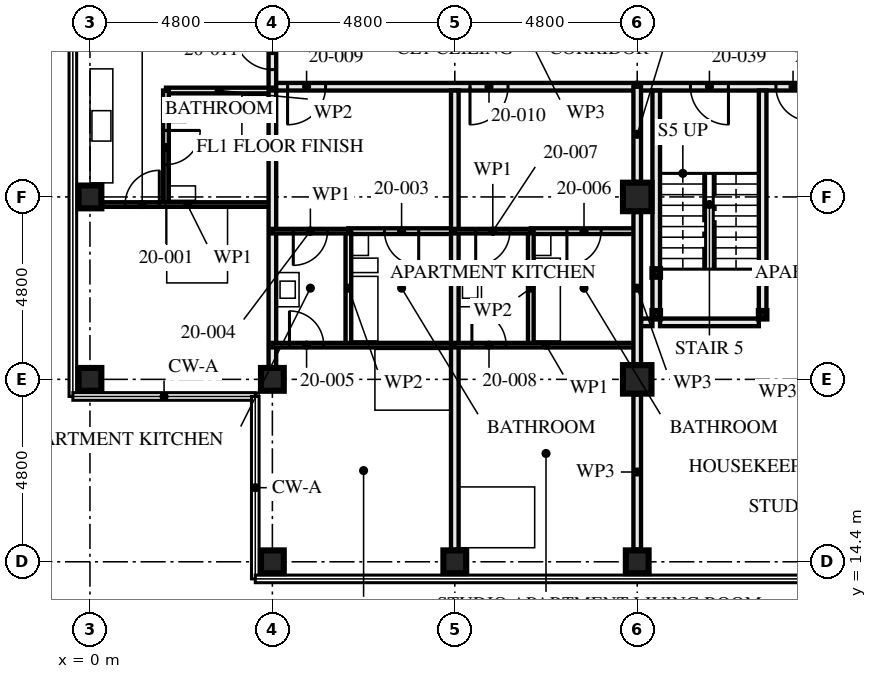
"""IFC4 building model, lengths in metres.
Left out: names, types, materials, properties, quantities, classifications, styles, units other than length and angle.
Written with IfcOpenShell. Run it as: python <this file> out.ifc"""

import sys

from ifc_helpers import new_model, si_unit, direction, frame, frame_2d, origin, origin_2d, place, context, subcontext, project, spatial, rectangle, hollow_rectangle, extrude, element, fill, save


model = new_model("IFC4")
c1 = context("Model", 3, precision=1e-05, world=origin(), true_north=direction((0.0, 1.0)))
c2 = subcontext(c1, "Body", "Model", "MODEL_VIEW")
j1 = project(units=[si_unit("LENGTHUNIT", "METRE"), si_unit("PLANEANGLEUNIT", "RADIAN")], contexts=[c1])
p1 = place(None, origin())
s1 = spatial("IfcSite", under=j1, at=p1, CompositionType="ELEMENT")
p2 = place(p1, origin())
s2 = spatial("IfcBuilding", under=s1, at=p2, CompositionType="ELEMENT")
p3 = place(p2, frame((0.0, 0.0, 76.0)))
s3 = spatial("IfcBuildingStorey", under=s2, at=p3, CompositionType="ELEMENT", Elevation=76.0)
for number, where, z_axis, x_axis in (
    (1, (0.0, 19.2, 0.0), (0.0, 0.0, 1.0), (0.0, 1.0, 0.0)),
    (2, (0.0, 24.0, 0.0), (0.0, 0.0, 1.0), (1.0, 0.0, 0.0)),
    (3, (4.8, 14.4, 0.0), (0.0, 0.0, 1.0), (0.0, 1.0, 0.0)),
    (4, (4.8, 19.2, 0.0), (0.0, 0.0, 1.0), (0.0, 1.0, 0.0)),
    (5, (9.6, 14.4, 0.0), (0.0, 0.0, 1.0), (0.0, 1.0, 0.0)),
    (6, (14.4, 14.4, 0.0), (0.0, 0.0, 1.0), (0.0, 1.0, 0.0)),
):
    element("IfcColumn", number, at=place(p3, frame(where, z_axis=z_axis, x_axis=x_axis)), inside=s3, PredefinedType="COLUMN", context=c2, shape_type="SweptSolid", body=[
        extrude(hollow_rectangle(XDim=0.6, YDim=0.6, WallThickness=0.08, at=origin_2d()), origin(), (0.0, 0.0, 1.0), 3.5),
    ])
for number, where, z_axis, x_axis in (
    (7, (14.4, 19.2, 0.0), (0.0, 0.0, 1.0), (1.0, 0.0, 0.0)),
    (8, (14.4, 24.0, 0.0), (0.0, 0.0, 1.0), (1.0, 0.0, 0.0)),
):
    element("IfcColumn", number, at=place(p3, frame(where, z_axis=z_axis, x_axis=x_axis)), inside=s3, PredefinedType="COLUMN", context=c2, shape_type="SweptSolid", body=[
        extrude(hollow_rectangle(XDim=0.75, YDim=0.75, WallThickness=0.08, at=origin_2d()), origin(), (0.0, 0.0, 1.0), 3.5),
    ])
for number, where, z_axis, x_axis in (
    (9, (14.9, 20.9, 0.0), (0.0, 0.0, 1.0), (1.0, 0.0, 0.0)),
    (10, (17.7, 20.9, 0.0), (0.0, 0.0, 1.0), (1.0, 0.0, 0.0)),
    (11, (14.9, 22.0, 0.0), (0.0, 0.0, 1.0), (1.0, 0.0, 0.0)),
    (12, (17.7, 22.0, 0.0), (0.0, 0.0, 1.0), (1.0, 0.0, 0.0)),
):
    element("IfcColumn", number, at=place(p3, frame(where, z_axis=z_axis, x_axis=x_axis)), inside=s3, PredefinedType="COLUMN", context=c2, shape_type="SweptSolid", body=[
        extrude(hollow_rectangle(XDim=0.2, YDim=0.2, WallThickness=0.008, at=origin_2d()), origin(), (0.0, 0.0, 1.0), 3.25),
    ])
p4 = place(p3, frame((2.0, 23.8, 0.0), z_axis=(0.0, 0.0, 1.0), x_axis=(0.0, 1.0, 0.0)))
e13 = element("IfcWall", 13, at=p4, inside=s3, PredefinedType="PARTITIONING", context=c2, shape_type="SweptSolid", body=[
    extrude(rectangle(XDim=3.0, YDim=0.15, at=frame_2d((1.5, 0.0))), origin(), (0.0, 0.0, 1.0), 2.04),
])
p5 = place(p4, frame((1.05, 0.0, 0.0)))
e14 = element("IfcOpeningElement", 14, at=p5, cuts=e13, PredefinedType="OPENING", context=c2, shape_type="SweptSolid", body=[
    extrude(rectangle(XDim=0.9, YDim=2.0, at=frame_2d((0.45, 1.0))), frame((0.0, 0.085, 0.0), z_axis=(0.0, -1.0, 0.0), x_axis=(1.0, 0.0, 0.0)), (0.0, 0.0, 1.0), 0.171),
])
p6 = place(p3, frame((2.0, 26.8, 0.0), z_axis=(0.0, 0.0, 1.0), x_axis=(1.0, 0.0, 0.0)))
e15 = element("IfcWall", 15, at=p6, inside=s3, PredefinedType="PARTITIONING", context=c2, shape_type="SweptSolid", body=[
    extrude(rectangle(XDim=2.8, YDim=0.15, at=frame_2d((1.4, 0.0))), origin(), (0.0, 0.0, 1.0), 3.25),
])
p7 = place(p3, frame((0.32, 23.8, 0.0), z_axis=(0.0, 0.0, 1.0), x_axis=(1.0, 0.0, 0.0)))
e16 = element("IfcWall", 16, at=p7, inside=s3, PredefinedType="PARTITIONING", context=c2, shape_type="SweptSolid", body=[
    extrude(rectangle(XDim=4.48, YDim=0.12, at=frame_2d((2.24, 0.0))), origin(), (0.0, 0.0, 1.0), 2.04),
])
p8 = place(p7, frame((0.605, 0.0, 0.0)))
e17 = element("IfcOpeningElement", 17, at=p8, cuts=e16, PredefinedType="OPENING", context=c2, shape_type="SweptSolid", body=[
    extrude(rectangle(XDim=0.9, YDim=2.0, at=frame_2d((0.45, 1.0))), frame((0.0, 0.071, 0.0), z_axis=(0.0, -1.0, 0.0), x_axis=(1.0, 0.0, 0.0)), (0.0, 0.0, 1.0), 0.141),
])
p9 = place(p3, frame((4.8, 19.52, 0.0), z_axis=(0.0, 0.0, 1.0), x_axis=(0.0, 1.0, 0.0)))
e18 = element("IfcWall", 18, at=p9, inside=s3, PredefinedType="PARTITIONING", context=c2, shape_type="SweptSolid", body=[
    extrude(rectangle(XDim=7.28, YDim=0.2, at=frame_2d((3.64, 0.0))), origin(), (0.0, 0.0, 1.0), 2.04),
])
p10 = place(p3, frame((6.8, 20.1, 0.0), z_axis=(0.0, 0.0, 1.0), x_axis=(0.0, 1.0, 0.0)))
e19 = element("IfcWall", 19, at=p10, inside=s3, PredefinedType="PARTITIONING", context=c2, shape_type="SweptSolid", body=[
    extrude(rectangle(XDim=3.0, YDim=0.15, at=frame_2d((1.5, 0.0))), origin(), (0.0, 0.0, 1.0), 3.25),
])
p11 = place(p3, frame((6.8, 23.1, 0.0), z_axis=(0.0, 0.0, 1.0), x_axis=(1.0, 0.0, 0.0)))
e20 = element("IfcWall", 20, at=p11, inside=s3, PredefinedType="PARTITIONING", context=c2, shape_type="SweptSolid", body=[
    extrude(rectangle(XDim=2.8, YDim=0.15, at=frame_2d((1.4, 0.0))), origin(), (0.0, 0.0, 1.0), 3.25),
])
p12 = place(p11, frame((0.95, 0.0, 0.0)))
e21 = element("IfcOpeningElement", 21, at=p12, cuts=e20, PredefinedType="OPENING", context=c2, shape_type="SweptSolid", body=[
    extrude(rectangle(XDim=0.9, YDim=2.1, at=frame_2d((0.45, 1.05))), frame((0.0, 0.085, 0.0), z_axis=(0.0, -1.0, 0.0), x_axis=(1.0, 0.0, 0.0)), (0.0, 0.0, 1.0), 0.171),
])
p13 = place(p3, frame((4.8, 23.1, 0.0), z_axis=(0.0, 0.0, 1.0), x_axis=(1.0, 0.0, 0.0)))
e22 = element("IfcWall", 22, at=p13, inside=s3, PredefinedType="PARTITIONING", context=c2, shape_type="SweptSolid", body=[
    extrude(rectangle(XDim=2.0, YDim=0.12, at=frame_2d((1.0, 0.0))), origin(), (0.0, 0.0, 1.0), 3.25),
])
p14 = place(p13, frame((0.55, 0.0, 0.0)))
e23 = element("IfcOpeningElement", 23, at=p14, cuts=e22, PredefinedType="OPENING", context=c2, shape_type="SweptSolid", body=[
    extrude(rectangle(XDim=0.9, YDim=2.1, at=frame_2d((0.45, 1.05))), frame((0.0, 0.071, 0.0), z_axis=(0.0, -1.0, 0.0), x_axis=(1.0, 0.0, 0.0)), (0.0, 0.0, 1.0), 0.141),
])
p15 = place(p3, frame((4.8, 20.1, 0.0), z_axis=(0.0, 0.0, 1.0), x_axis=(1.0, 0.0, 0.0)))
e24 = element("IfcWall", 24, at=p15, inside=s3, PredefinedType="PARTITIONING", context=c2, shape_type="SweptSolid", body=[
    extrude(rectangle(XDim=4.8, YDim=0.12, at=frame_2d((2.4, 0.0))), origin(), (0.0, 0.0, 1.0), 3.25),
])
p16 = place(p15, frame((0.45, 0.0, 0.0)))
e25 = element("IfcOpeningElement", 25, at=p16, cuts=e24, PredefinedType="OPENING", context=c2, shape_type="SweptSolid", body=[
    extrude(rectangle(XDim=0.9, YDim=2.1, at=frame_2d((0.45, 1.05))), frame((0.0, 0.071, 0.0), z_axis=(0.0, -1.0, 0.0), x_axis=(1.0, 0.0, 0.0)), (0.0, 0.0, 1.0), 0.141),
])
p17 = place(p3, frame((9.6, 14.72, 0.0), z_axis=(0.0, 0.0, 1.0), x_axis=(0.0, 1.0, 0.0)))
e26 = element("IfcWall", 26, at=p17, inside=s3, PredefinedType="PARTITIONING", context=c2, shape_type="SweptSolid", body=[
    extrude(rectangle(XDim=12.08, YDim=0.2, at=frame_2d((6.04, 0.0))), origin(), (0.0, 0.0, 1.0), 2.04),
])
p18 = place(p3, frame((11.6, 20.1, 0.0), z_axis=(0.0, 0.0, 1.0), x_axis=(0.0, 1.0, 0.0)))
e27 = element("IfcWall", 27, at=p18, inside=s3, PredefinedType="PARTITIONING", context=c2, shape_type="SweptSolid", body=[
    extrude(rectangle(XDim=3.0, YDim=0.15, at=frame_2d((1.5, 0.0))), origin(), (0.0, 0.0, 1.0), 3.25),
])
p19 = place(p3, frame((11.6, 23.1, 0.0), z_axis=(0.0, 0.0, 1.0), x_axis=(1.0, 0.0, 0.0)))
e28 = element("IfcWall", 28, at=p19, inside=s3, PredefinedType="PARTITIONING", context=c2, shape_type="SweptSolid", body=[
    extrude(rectangle(XDim=2.8, YDim=0.15, at=frame_2d((1.4, 0.0))), origin(), (0.0, 0.0, 1.0), 3.25),
])
p20 = place(p19, frame((0.95, 0.0, 0.0)))
e29 = element("IfcOpeningElement", 29, at=p20, cuts=e28, PredefinedType="OPENING", context=c2, shape_type="SweptSolid", body=[
    extrude(rectangle(XDim=0.9, YDim=2.1, at=frame_2d((0.45, 1.05))), frame((0.0, 0.085, 0.0), z_axis=(0.0, -1.0, 0.0), x_axis=(1.0, 0.0, 0.0)), (0.0, 0.0, 1.0), 0.171),
])
p21 = place(p3, frame((9.6, 23.1, 0.0), z_axis=(0.0, 0.0, 1.0), x_axis=(1.0, 0.0, 0.0)))
e30 = element("IfcWall", 30, at=p21, inside=s3, PredefinedType="PARTITIONING", context=c2, shape_type="SweptSolid", body=[
    extrude(rectangle(XDim=2.0, YDim=0.12, at=frame_2d((1.0, 0.0))), origin(), (0.0, 0.0, 1.0), 3.25),
])
p22 = place(p21, frame((0.55, 0.0, 0.0)))
e31 = element("IfcOpeningElement", 31, at=p22, cuts=e30, PredefinedType="OPENING", context=c2, shape_type="SweptSolid", body=[
    extrude(rectangle(XDim=0.9, YDim=2.1, at=frame_2d((0.45, 1.05))), frame((0.0, 0.071, 0.0), z_axis=(0.0, -1.0, 0.0), x_axis=(1.0, 0.0, 0.0)), (0.0, 0.0, 1.0), 0.141),
])
p23 = place(p3, frame((9.6, 20.1, 0.0), z_axis=(0.0, 0.0, 1.0), x_axis=(1.0, 0.0, 0.0)))
e32 = element("IfcWall", 32, at=p23, inside=s3, PredefinedType="PARTITIONING", context=c2, shape_type="SweptSolid", body=[
    extrude(rectangle(XDim=4.8, YDim=0.12, at=frame_2d((2.4, 0.0))), origin(), (0.0, 0.0, 1.0), 3.25),
])
p24 = place(p23, frame((0.45, 0.0, 0.0)))
e33 = element("IfcOpeningElement", 33, at=p24, cuts=e32, PredefinedType="OPENING", context=c2, shape_type="SweptSolid", body=[
    extrude(rectangle(XDim=0.9, YDim=2.1, at=frame_2d((0.45, 1.05))), frame((0.0, 0.071, 0.0), z_axis=(0.0, -1.0, 0.0), x_axis=(1.0, 0.0, 0.0)), (0.0, 0.0, 1.0), 0.141),
])
p25 = place(p3, frame((4.8, 26.9, 0.0), z_axis=(0.0, 0.0, 1.0), x_axis=(1.0, 0.0, 0.0)))
e34 = element("IfcWall", 34, at=p25, inside=s3, PredefinedType="PARTITIONING", context=c2, shape_type="SweptSolid", body=[
    extrude(rectangle(XDim=9.6, YDim=0.2, at=frame_2d((4.8, 0.0))), origin(), (0.0, 0.0, 1.0), 3.25),
])
p26 = place(p25, frame((0.4, 0.0, 0.0)))
e35 = element("IfcOpeningElement", 35, at=p26, cuts=e34, PredefinedType="OPENING", context=c2, shape_type="SweptSolid", body=[
    extrude(rectangle(XDim=1.0, YDim=2.1, at=frame_2d((0.5, 1.05))), frame((0.0, 0.111, 0.0), z_axis=(0.0, -1.0, 0.0), x_axis=(1.0, 0.0, 0.0)), (0.0, 0.0, 1.0), 0.221),
])
p27 = place(p25, frame((5.2, 0.0, 0.0)))
e36 = element("IfcOpeningElement", 36, at=p27, cuts=e34, PredefinedType="OPENING", context=c2, shape_type="SweptSolid", body=[
    extrude(rectangle(XDim=1.0, YDim=2.1, at=frame_2d((0.5, 1.05))), frame((0.0, 0.111, 0.0), z_axis=(0.0, -1.0, 0.0), x_axis=(1.0, 0.0, 0.0)), (0.0, 0.0, 1.0), 0.221),
])
p28 = place(p3, frame((4.8, 26.8, 0.0), z_axis=(0.0, 0.0, 1.0), x_axis=(0.0, 1.0, 0.0)))
e37 = element("IfcWall", 37, at=p28, inside=s3, PredefinedType="PARTITIONING", context=c2, shape_type="SweptSolid", body=[
    extrude(rectangle(XDim=1.605, YDim=0.2, at=frame_2d((0.802, 0.0))), origin(), (0.0, 0.0, 1.0), 3.25),
])
p29 = place(p28, frame((0.55, 0.0, 0.0)))
e38 = element("IfcOpeningElement", 38, at=p29, cuts=e37, PredefinedType="OPENING", context=c2, shape_type="SweptSolid", body=[
    extrude(rectangle(XDim=1.0, YDim=2.1, at=frame_2d((0.5, 1.05))), frame((0.0, 0.111, 0.0), z_axis=(0.0, -1.0, 0.0), x_axis=(1.0, 0.0, 0.0)), (0.0, 0.0, 1.0), 0.221),
])
p30 = place(p3, frame((14.9, 21.0, 0.0), z_axis=(0.0, 0.0, 1.0), x_axis=(0.0, 1.0, 0.0)))
e39 = element("IfcWall", 39, at=p30, inside=s3, PredefinedType="SOLIDWALL", context=c2, shape_type="SweptSolid", body=[
    extrude(rectangle(XDim=0.9, YDim=0.2, at=frame_2d((0.45, 0.0))), origin(), (0.0, 0.0, 1.0), 2.94),
])
p31 = place(p3, frame((14.9, 22.1, 0.0), z_axis=(0.0, 0.0, 1.0), x_axis=(0.0, 1.0, 0.0)))
e40 = element("IfcWall", 40, at=p31, inside=s3, PredefinedType="SOLIDWALL", context=c2, shape_type="SweptSolid", body=[
    extrude(rectangle(XDim=4.7, YDim=0.2, at=frame_2d((2.35, 0.0))), origin(), (0.0, 0.0, 1.0), 2.94),
])
p32 = place(p3, frame((17.7, 21.0, 0.0), z_axis=(0.0, 0.0, 1.0), x_axis=(0.0, 1.0, 0.0)))
e41 = element("IfcWall", 41, at=p32, inside=s3, PredefinedType="SOLIDWALL", context=c2, shape_type="SweptSolid", body=[
    extrude(rectangle(XDim=0.9, YDim=0.2, at=frame_2d((0.45, 0.0))), origin(), (0.0, 0.0, 1.0), 2.94),
])
p33 = place(p3, frame((17.7, 22.1, 0.0), z_axis=(0.0, 0.0, 1.0), x_axis=(0.0, 1.0, 0.0)))
e42 = element("IfcWall", 42, at=p33, inside=s3, PredefinedType="SOLIDWALL", context=c2, shape_type="SweptSolid", body=[
    extrude(rectangle(XDim=4.7, YDim=0.2, at=frame_2d((2.35, 0.0))), origin(), (0.0, 0.0, 1.0), 2.94),
])
p34 = place(p3, frame((14.5, 20.7, 0.0), z_axis=(0.0, 0.0, 1.0), x_axis=(1.0, 0.0, 0.0)))
e43 = element("IfcWall", 43, at=p34, inside=s3, PredefinedType="SOLIDWALL", context=c2, shape_type="SweptSolid", body=[
    extrude(rectangle(XDim=0.3, YDim=0.2, at=frame_2d((0.15, 0.0))), origin(), (0.0, 0.0, 1.0), 3.25),
])
p35 = place(p3, frame((15.0, 20.7, 0.0), z_axis=(0.0, 0.0, 1.0), x_axis=(1.0, 0.0, 0.0)))
e44 = element("IfcWall", 44, at=p35, inside=s3, PredefinedType="SOLIDWALL", context=c2, shape_type="SweptSolid", body=[
    extrude(rectangle(XDim=2.6, YDim=0.2, at=frame_2d((1.3, 0.0))), origin(), (0.0, 0.0, 1.0), 3.25),
])
p36 = place(p3, frame((14.4, 26.9, 0.0), z_axis=(0.0, 0.0, 1.0), x_axis=(1.0, 0.0, 0.0)))
e45 = element("IfcWall", 45, at=p36, inside=s3, PredefinedType="PARTITIONING", context=c2, shape_type="SweptSolid", body=[
    extrude(rectangle(XDim=14.4, YDim=0.2, at=frame_2d((7.2, 0.0))), origin(), (0.0, 0.0, 1.0), 2.04),
])
p37 = place(p36, frame((1.4, 0.0, 0.0)))
e46 = element("IfcOpeningElement", 46, at=p37, cuts=e45, PredefinedType="OPENING", context=c2, shape_type="SweptSolid", body=[
    extrude(rectangle(XDim=1.0, YDim=2.0, at=frame_2d((0.5, 1.0))), frame((0.0, 0.111, 0.0), z_axis=(0.0, -1.0, 0.0), x_axis=(1.0, 0.0, 0.0)), (0.0, 0.0, 1.0), 0.221),
])
p38 = place(p36, frame((3.65, 0.0, 0.0)))
e47 = element("IfcOpeningElement", 47, at=p38, cuts=e45, PredefinedType="OPENING", context=c2, shape_type="SweptSolid", body=[
    extrude(rectangle(XDim=0.9, YDim=2.0, at=frame_2d((0.45, 1.0))), frame((0.0, 0.111, 0.0), z_axis=(0.0, -1.0, 0.0), x_axis=(1.0, 0.0, 0.0)), (0.0, 0.0, 1.0), 0.221),
])
p39 = place(p36, frame((5.2, 0.0, 0.0)))
e48 = element("IfcOpeningElement", 48, at=p39, cuts=e45, PredefinedType="OPENING", context=c2, shape_type="SweptSolid", body=[
    extrude(rectangle(XDim=1.0, YDim=2.0, at=frame_2d((0.5, 1.0))), frame((0.0, 0.111, 0.0), z_axis=(0.0, -1.0, 0.0), x_axis=(1.0, 0.0, 0.0)), (0.0, 0.0, 1.0), 0.221),
])
p40 = place(p36, frame((10.0, 0.0, 0.0)))
e49 = element("IfcOpeningElement", 49, at=p40, cuts=e45, PredefinedType="OPENING", context=c2, shape_type="SweptSolid", body=[
    extrude(rectangle(XDim=1.0, YDim=2.0, at=frame_2d((0.5, 1.0))), frame((0.0, 0.111, 0.0), z_axis=(0.0, -1.0, 0.0), x_axis=(1.0, 0.0, 0.0)), (0.0, 0.0, 1.0), 0.221),
])
p41 = place(p3, frame((14.4, 14.72, 0.0), z_axis=(0.0, 0.0, 1.0), x_axis=(0.0, 1.0, 0.0)))
e50 = element("IfcWall", 50, at=p41, inside=s3, PredefinedType="PARTITIONING", context=c2, shape_type="SweptSolid", body=[
    extrude(rectangle(XDim=4.085, YDim=0.2, at=frame_2d((2.042, 0.0))), origin(), (0.0, 0.0, 1.0), 2.04),
])
p42 = place(p3, frame((14.4, 19.595, 0.0), z_axis=(0.0, 0.0, 1.0), x_axis=(0.0, 1.0, 0.0)))
e51 = element("IfcWall", 51, at=p42, inside=s3, PredefinedType="PARTITIONING", context=c2, shape_type="SweptSolid", body=[
    extrude(rectangle(XDim=4.01, YDim=0.2, at=frame_2d((2.005, 0.0))), origin(), (0.0, 0.0, 1.0), 2.04),
])
p43 = place(p3, frame((14.4, 24.395, 0.0), z_axis=(0.0, 0.0, 1.0), x_axis=(0.0, 1.0, 0.0)))
e52 = element("IfcWall", 52, at=p43, inside=s3, PredefinedType="PARTITIONING", context=c2, shape_type="SweptSolid", body=[
    extrude(rectangle(XDim=2.505, YDim=0.2, at=frame_2d((1.252, 0.0))), origin(), (0.0, 0.0, 1.0), 2.04),
])
p44 = place(p5, frame((0.9, 0.0, 0.0), z_axis=(0.0, 0.0, 1.0), x_axis=(-1.0, 0.0, 0.0)))
e53 = element("IfcDoor", 53, at=p44, inside=s3, OperationType="SINGLE_SWING_RIGHT", PredefinedType="DOOR", context=c2, shape_type="SweptSolid", body=[
    extrude(rectangle(XDim=0.9, YDim=2.0, at=frame_2d((0.45, 1.0))), frame((0.0, 0.022, 0.0), z_axis=(0.0, -1.0, 0.0), x_axis=(1.0, 0.0, 0.0)), (0.0, 0.0, 1.0), 0.044),
])
fill(e14, e53)
p45 = place(p8, origin())
e54 = element("IfcDoor", 54, at=p45, inside=s3, OperationType="SINGLE_SWING_LEFT", PredefinedType="DOOR", context=c2, shape_type="SweptSolid", body=[
    extrude(rectangle(XDim=0.9, YDim=2.0, at=frame_2d((0.45, 1.0))), frame((0.0, 0.022, 0.0), z_axis=(0.0, -1.0, 0.0), x_axis=(1.0, 0.0, 0.0)), (0.0, 0.0, 1.0), 0.044),
])
fill(e17, e54)
p46 = place(p12, frame((0.9, 0.0, 0.0), z_axis=(0.0, 0.0, 1.0), x_axis=(-1.0, 0.0, 0.0)))
e55 = element("IfcDoor", 55, at=p46, inside=s3, OperationType="SINGLE_SWING_RIGHT", PredefinedType="DOOR", context=c2, shape_type="SweptSolid", body=[
    extrude(rectangle(XDim=0.9, YDim=2.1, at=frame_2d((0.45, 1.05))), frame((0.0, 0.022, 0.0), z_axis=(0.0, -1.0, 0.0), x_axis=(1.0, 0.0, 0.0)), (0.0, 0.0, 1.0), 0.044),
])
fill(e21, e55)
p47 = place(p14, frame((0.9, 0.0, 0.0), z_axis=(0.0, 0.0, 1.0), x_axis=(-1.0, 0.0, 0.0)))
e56 = element("IfcDoor", 56, at=p47, inside=s3, OperationType="SINGLE_SWING_LEFT", PredefinedType="DOOR", context=c2, shape_type="SweptSolid", body=[
    extrude(rectangle(XDim=0.9, YDim=2.1, at=frame_2d((0.45, 1.05))), frame((0.0, 0.022, 0.0), z_axis=(0.0, -1.0, 0.0), x_axis=(1.0, 0.0, 0.0)), (0.0, 0.0, 1.0), 0.044),
])
fill(e23, e56)
p48 = place(p16, origin())
e57 = element("IfcDoor", 57, at=p48, inside=s3, OperationType="SINGLE_SWING_RIGHT", PredefinedType="DOOR", context=c2, shape_type="SweptSolid", body=[
    extrude(rectangle(XDim=0.9, YDim=2.1, at=frame_2d((0.45, 1.05))), frame((0.0, 0.022, 0.0), z_axis=(0.0, -1.0, 0.0), x_axis=(1.0, 0.0, 0.0)), (0.0, 0.0, 1.0), 0.044),
])
fill(e25, e57)
p49 = place(p20, frame((0.9, 0.0, 0.0), z_axis=(0.0, 0.0, 1.0), x_axis=(-1.0, 0.0, 0.0)))
e58 = element("IfcDoor", 58, at=p49, inside=s3, OperationType="SINGLE_SWING_LEFT", PredefinedType="DOOR", context=c2, shape_type="SweptSolid", body=[
    extrude(rectangle(XDim=0.9, YDim=2.1, at=frame_2d((0.45, 1.05))), frame((0.0, 0.022, 0.0), z_axis=(0.0, -1.0, 0.0), x_axis=(1.0, 0.0, 0.0)), (0.0, 0.0, 1.0), 0.044),
])
fill(e29, e58)
p50 = place(p22, frame((0.9, 0.0, 0.0), z_axis=(0.0, 0.0, 1.0), x_axis=(-1.0, 0.0, 0.0)))
e59 = element("IfcDoor", 59, at=p50, inside=s3, OperationType="SINGLE_SWING_LEFT", PredefinedType="DOOR", context=c2, shape_type="SweptSolid", body=[
    extrude(rectangle(XDim=0.9, YDim=2.1, at=frame_2d((0.45, 1.05))), frame((0.0, 0.022, 0.0), z_axis=(0.0, -1.0, 0.0), x_axis=(1.0, 0.0, 0.0)), (0.0, 0.0, 1.0), 0.044),
])
fill(e31, e59)
p51 = place(p24, origin())
e60 = element("IfcDoor", 60, at=p51, inside=s3, OperationType="SINGLE_SWING_RIGHT", PredefinedType="DOOR", context=c2, shape_type="SweptSolid", body=[
    extrude(rectangle(XDim=0.9, YDim=2.1, at=frame_2d((0.45, 1.05))), frame((0.0, 0.022, 0.0), z_axis=(0.0, -1.0, 0.0), x_axis=(1.0, 0.0, 0.0)), (0.0, 0.0, 1.0), 0.044),
])
fill(e33, e60)
p52 = place(p26, frame((1.0, 0.0, 0.0), z_axis=(0.0, 0.0, 1.0), x_axis=(-1.0, 0.0, 0.0)))
e61 = element("IfcDoor", 61, at=p52, inside=s3, OperationType="SINGLE_SWING_LEFT", PredefinedType="DOOR", context=c2, shape_type="SweptSolid", body=[
    extrude(rectangle(XDim=1.0, YDim=2.1, at=frame_2d((0.5, 1.05))), frame((0.0, 0.027, 0.0), z_axis=(0.0, -1.0, 0.0), x_axis=(1.0, 0.0, 0.0)), (0.0, 0.0, 1.0), 0.054),
])
fill(e35, e61)
p53 = place(p27, frame((1.0, 0.0, 0.0), z_axis=(0.0, 0.0, 1.0), x_axis=(-1.0, 0.0, 0.0)))
e62 = element("IfcDoor", 62, at=p53, inside=s3, OperationType="SINGLE_SWING_LEFT", PredefinedType="DOOR", context=c2, shape_type="SweptSolid", body=[
    extrude(rectangle(XDim=1.0, YDim=2.1, at=frame_2d((0.5, 1.05))), frame((0.0, 0.027, 0.0), z_axis=(0.0, -1.0, 0.0), x_axis=(1.0, 0.0, 0.0)), (0.0, 0.0, 1.0), 0.054),
])
fill(e36, e62)
p54 = place(p29, origin())
e63 = element("IfcDoor", 63, at=p54, inside=s3, OperationType="SINGLE_SWING_LEFT", PredefinedType="DOOR", context=c2, shape_type="SweptSolid", body=[
    extrude(rectangle(XDim=1.0, YDim=2.1, at=frame_2d((0.5, 1.05))), frame((0.0, 0.027, 0.0), z_axis=(0.0, -1.0, 0.0), x_axis=(1.0, 0.0, 0.0)), (0.0, 0.0, 1.0), 0.054),
])
fill(e38, e63)
p55 = place(p37, frame((1.0, 0.0, 0.0), z_axis=(0.0, 0.0, 1.0), x_axis=(-1.0, 0.0, 0.0)))
e64 = element("IfcDoor", 64, at=p55, inside=s3, OperationType="SINGLE_SWING_RIGHT", PredefinedType="DOOR", context=c2, shape_type="SweptSolid", body=[
    extrude(rectangle(XDim=1.0, YDim=2.0, at=frame_2d((0.5, 1.0))), frame((0.0, 0.032, 0.0), z_axis=(0.0, -1.0, 0.0), x_axis=(1.0, 0.0, 0.0)), (0.0, 0.0, 1.0), 0.064),
])
fill(e46, e64)
p56 = place(p38, frame((0.9, 0.0, 0.0), z_axis=(0.0, 0.0, 1.0), x_axis=(-1.0, 0.0, 0.0)))
e65 = element("IfcDoor", 65, at=p56, inside=s3, OperationType="SINGLE_SWING_RIGHT", PredefinedType="DOOR", context=c2, shape_type="SweptSolid", body=[
    extrude(rectangle(XDim=0.9, YDim=2.0, at=frame_2d((0.45, 1.0))), frame((0.0, 0.027, 0.0), z_axis=(0.0, -1.0, 0.0), x_axis=(1.0, 0.0, 0.0)), (0.0, 0.0, 1.0), 0.054),
])
fill(e47, e65)
save(model, sys.argv[1])
